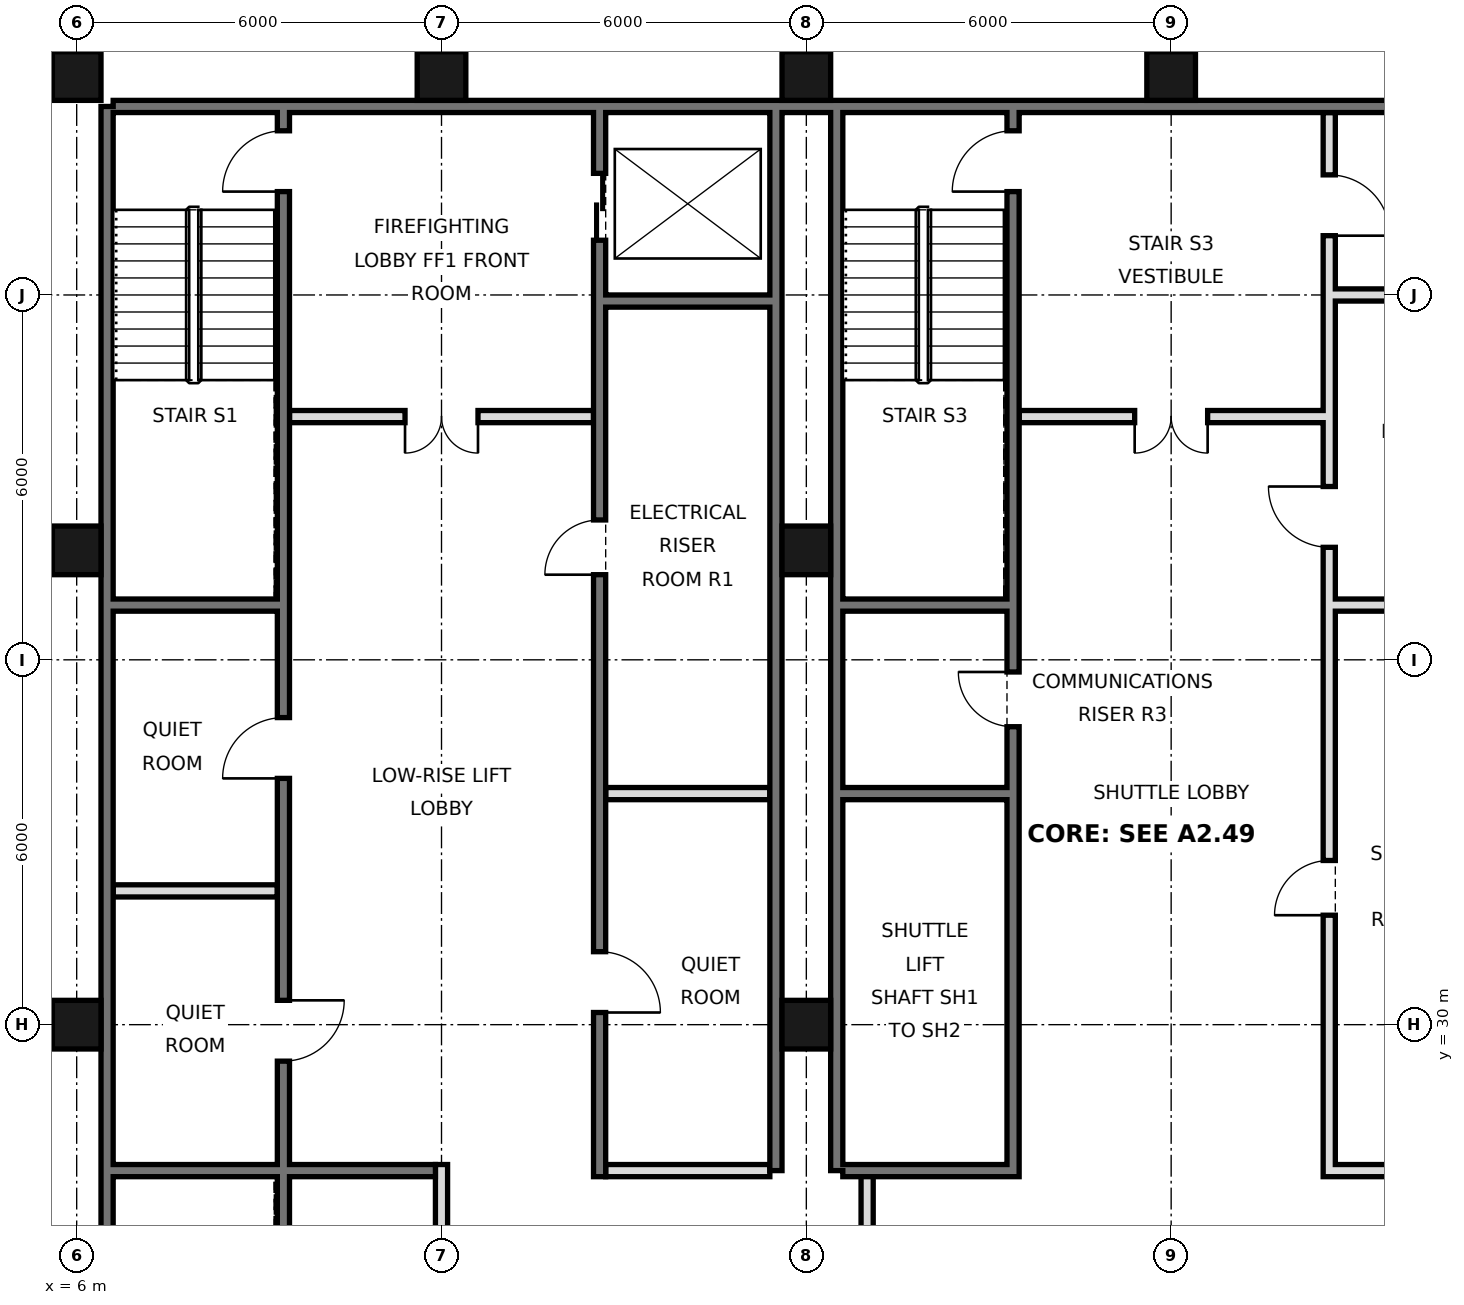
"""IFC4 building model, lengths in metres.
Left out: names, types, materials, properties, quantities, classifications, styles, units other than length and angle.
Written with IfcOpenShell. Run it as: python <this file> out.ifc"""

import sys

from ifc_helpers import new_model, si_unit, direction, frame, frame_2d, origin, origin_2d, place, context, subcontext, project, spatial, rectangle, hollow_rectangle, extrude, element, fill, save


model = new_model("IFC4")
c1 = context("Model", 3, precision=1e-05, world=origin(), true_north=direction((0.0, 1.0)))
c2 = subcontext(c1, "Body", "Model", "MODEL_VIEW")
j1 = project(units=[si_unit("LENGTHUNIT", "METRE"), si_unit("PLANEANGLEUNIT", "RADIAN")], contexts=[c1])
p1 = place(None, origin())
s1 = spatial("IfcSite", under=j1, at=p1, CompositionType="ELEMENT")
p2 = place(p1, origin())
s2 = spatial("IfcBuilding", under=s1, at=p2, CompositionType="ELEMENT")
p3 = place(p2, frame((0.0, 0.0, 195.6)))
s3 = spatial("IfcBuildingStorey", under=s2, at=p3, CompositionType="ELEMENT", Elevation=195.6)
for number, where, z_axis, x_axis in (
    (1, (6.0, 30.0, 0.0), (0.0, 0.0, 1.0), (1.0, 0.0, 0.0)),
    (2, (6.0, 37.8, 0.0), (0.0, 0.0, 1.0), (1.0, 0.0, 0.0)),
    (3, (6.0, 45.6, 0.0), (0.0, 0.0, 1.0), (1.0, 0.0, 0.0)),
    (4, (12.0, 45.6, 0.0), (0.0, 0.0, 1.0), (1.0, 0.0, 0.0)),
    (5, (18.0, 30.0, 0.0), (0.0, 0.0, 1.0), (1.0, 0.0, 0.0)),
    (6, (18.0, 37.8, 0.0), (0.0, 0.0, 1.0), (1.0, 0.0, 0.0)),
    (7, (18.0, 45.6, 0.0), (0.0, 0.0, 1.0), (1.0, 0.0, 0.0)),
    (8, (24.0, 45.6, 0.0), (0.0, 0.0, 1.0), (1.0, 0.0, 0.0)),
):
    element("IfcColumn", number, at=place(p3, frame(where, z_axis=z_axis, x_axis=x_axis)), inside=s3, PredefinedType="COLUMN", context=c2, shape_type="SweptSolid", body=[
        extrude(hollow_rectangle(XDim=0.8, YDim=0.8, WallThickness=0.045, at=origin_2d()), origin(), (0.0, 0.0, 1.0), 3.6),
    ])
p4 = place(p3, frame((6.5, 21.6, 0.0), z_axis=(0.0, 0.0, 1.0), x_axis=(0.0, 1.0, 0.0)))
e9 = element("IfcWall", 9, at=p4, inside=s3, PredefinedType="SOLIDWALL", context=c2, shape_type="SweptSolid", body=[
    extrude(rectangle(XDim=23.5, YDim=0.2, at=frame_2d((11.75, 0.0))), origin(), (0.0, 0.0, 1.0), 3.42),
])
p5 = place(p3, frame((6.6, 45.1, 0.0), z_axis=(0.0, 0.0, 1.0), x_axis=(1.0, 0.0, 0.0)))
e10 = element("IfcWall", 10, at=p5, inside=s3, PredefinedType="SOLIDWALL", context=c2, shape_type="SweptSolid", body=[
    extrude(rectangle(XDim=34.8, YDim=0.2, at=frame_2d((17.4, 0.0))), origin(), (0.0, 0.0, 1.0), 3.42),
])
for number, where, z_axis, x_axis in (
    (11, (17.5, 27.6, 0.0), (0.0, 0.0, 1.0), (0.0, 1.0, 0.0)),
    (12, (18.5, 27.6, 0.0), (0.0, 0.0, 1.0), (0.0, 1.0, 0.0)),
):
    element("IfcWall", number, at=place(p3, frame(where, z_axis=z_axis, x_axis=x_axis)), inside=s3, PredefinedType="SOLIDWALL", context=c2, shape_type="SweptSolid", body=[
        extrude(rectangle(XDim=17.5, YDim=0.2, at=frame_2d((8.75, 0.0))), origin(), (0.0, 0.0, 1.0), 3.42),
    ])
p6 = place(p3, frame((19.0, 21.6, 0.0), z_axis=(0.0, 0.0, 1.0), x_axis=(0.0, 1.0, 0.0)))
e13 = element("IfcWall", 13, at=p6, inside=s3, PredefinedType="PARTITIONING", context=c2, shape_type="SweptSolid", body=[
    extrude(rectangle(XDim=6.0, YDim=0.2, at=frame_2d((3.0, 0.0))), origin(), (0.0, 0.0, 1.0), 3.42),
])
p7 = place(p6, frame((2.1, 0.0, 0.0)))
e14 = element("IfcOpeningElement", 14, at=p7, cuts=e13, PredefinedType="OPENING", context=c2, shape_type="SweptSolid", body=[
    extrude(rectangle(XDim=1.8, YDim=2.1, at=frame_2d((0.9, 1.05))), frame((0.0, 0.11, 0.0), z_axis=(0.0, -1.0, 0.0), x_axis=(1.0, 0.0, 0.0)), (0.0, 0.0, 1.0), 0.22),
])
p8 = place(p3, frame((12.0, 21.6, 0.0), z_axis=(0.0, 0.0, 1.0), x_axis=(0.0, 1.0, 0.0)))
e15 = element("IfcWall", 15, at=p8, inside=s3, PredefinedType="PARTITIONING", context=c2, shape_type="SweptSolid", body=[
    extrude(rectangle(XDim=6.1, YDim=0.2, at=frame_2d((3.05, 0.0))), origin(), (0.0, 0.0, 1.0), 3.42),
])
p9 = place(p3, frame((14.6, 27.5, 0.0), z_axis=(0.0, 0.0, 1.0), x_axis=(0.0, 1.0, 0.0)))
e16 = element("IfcWall", 16, at=p9, inside=s3, PredefinedType="SOLIDWALL", context=c2, shape_type="SweptSolid", body=[
    extrude(rectangle(XDim=17.5, YDim=0.2, at=frame_2d((8.75, 0.0))), origin(), (0.0, 0.0, 1.0), 3.42),
])
p10 = place(p9, frame((15.4, 0.0, 0.0)))
e17 = element("IfcOpeningElement", 17, at=p10, cuts=e16, PredefinedType="OPENING", context=c2, shape_type="SweptSolid", body=[
    extrude(rectangle(XDim=1.1, YDim=2.1, at=frame_2d((0.55, 1.05))), frame((0.0, 0.11, 0.0), z_axis=(0.0, -1.0, 0.0), x_axis=(1.0, 0.0, 0.0)), (0.0, 0.0, 1.0), 0.22),
])
p11 = place(p9, frame((2.7, 0.0, 0.0)))
e18 = element("IfcOpeningElement", 18, at=p11, cuts=e16, PredefinedType="OPENING", context=c2, shape_type="SweptSolid", body=[
    extrude(rectangle(XDim=1.0, YDim=2.1, at=frame_2d((0.5, 1.05))), frame((0.0, 0.11, 0.0), z_axis=(0.0, -1.0, 0.0), x_axis=(1.0, 0.0, 0.0)), (0.0, 0.0, 1.0), 0.22),
])
p12 = place(p9, frame((9.9, 0.0, 0.0)))
e19 = element("IfcOpeningElement", 19, at=p12, cuts=e16, PredefinedType="OPENING", context=c2, shape_type="SweptSolid", body=[
    extrude(rectangle(XDim=0.9, YDim=2.1, at=frame_2d((0.45, 1.05))), frame((0.0, 0.11, 0.0), z_axis=(0.0, -1.0, 0.0), x_axis=(1.0, 0.0, 0.0)), (0.0, 0.0, 1.0), 0.22),
])
p13 = place(p3, frame((21.4, 27.5, 0.0), z_axis=(0.0, 0.0, 1.0), x_axis=(0.0, 1.0, 0.0)))
e20 = element("IfcWall", 20, at=p13, inside=s3, PredefinedType="SOLIDWALL", context=c2, shape_type="SweptSolid", body=[
    extrude(rectangle(XDim=17.5, YDim=0.2, at=frame_2d((8.75, 0.0))), origin(), (0.0, 0.0, 1.0), 3.42),
])
p14 = place(p13, frame((16.2, 0.0, 0.0)))
e21 = element("IfcOpeningElement", 21, at=p14, cuts=e20, PredefinedType="OPENING", context=c2, shape_type="SweptSolid", body=[
    extrude(rectangle(XDim=1.0, YDim=2.1, at=frame_2d((0.5, 1.05))), frame((0.0, 0.11, 0.0), z_axis=(0.0, -1.0, 0.0), x_axis=(1.0, 0.0, 0.0)), (0.0, 0.0, 1.0), 0.22),
])
p15 = place(p13, frame((7.4, 0.0, 0.0)))
e22 = element("IfcOpeningElement", 22, at=p15, cuts=e20, PredefinedType="OPENING", context=c2, shape_type="SweptSolid", body=[
    extrude(rectangle(XDim=0.9, YDim=2.1, at=frame_2d((0.45, 1.05))), frame((0.0, 0.11, 0.0), z_axis=(0.0, -1.0, 0.0), x_axis=(1.0, 0.0, 0.0)), (0.0, 0.0, 1.0), 0.22),
])
p16 = place(p3, frame((26.6, 27.5, 0.0), z_axis=(0.0, 0.0, 1.0), x_axis=(0.0, 1.0, 0.0)))
e23 = element("IfcWall", 23, at=p16, inside=s3, PredefinedType="SOLIDWALL", context=c2, shape_type="SweptSolid", body=[
    extrude(rectangle(XDim=17.5, YDim=0.2, at=frame_2d((8.75, 0.0))), origin(), (0.0, 0.0, 1.0), 3.42),
])
p17 = place(p16, frame((4.3, 0.0, 0.0)))
e24 = element("IfcOpeningElement", 24, at=p17, cuts=e23, PredefinedType="OPENING", context=c2, shape_type="SweptSolid", body=[
    extrude(rectangle(XDim=0.9, YDim=2.1, at=frame_2d((0.45, 1.05))), frame((0.0, 0.11, 0.0), z_axis=(0.0, -1.0, 0.0), x_axis=(1.0, 0.0, 0.0)), (0.0, 0.0, 1.0), 0.22),
])
p18 = place(p16, frame((10.35, 0.0, 0.0)))
e25 = element("IfcOpeningElement", 25, at=p18, cuts=e23, PredefinedType="OPENING", context=c2, shape_type="SweptSolid", body=[
    extrude(rectangle(XDim=1.0, YDim=2.1, at=frame_2d((0.5, 1.05))), frame((0.0, 0.11, 0.0), z_axis=(0.0, -1.0, 0.0), x_axis=(1.0, 0.0, 0.0)), (0.0, 0.0, 1.0), 0.22),
])
p19 = place(p16, frame((15.475, 0.0, 0.0)))
e26 = element("IfcOpeningElement", 26, at=p19, cuts=e23, PredefinedType="OPENING", context=c2, shape_type="SweptSolid", body=[
    extrude(rectangle(XDim=1.0, YDim=2.1, at=frame_2d((0.5, 1.05))), frame((0.0, 0.11, 0.0), z_axis=(0.0, -1.0, 0.0), x_axis=(1.0, 0.0, 0.0)), (0.0, 0.0, 1.0), 0.22),
])
p20 = place(p3, frame((9.4, 21.6, 0.0), z_axis=(0.0, 0.0, 1.0), x_axis=(0.0, 1.0, 0.0)))
e27 = element("IfcWall", 27, at=p20, inside=s3, PredefinedType="SOLIDWALL", context=c2, shape_type="SweptSolid", body=[
    extrude(rectangle(XDim=23.4, YDim=0.2, at=frame_2d((11.7, 0.0))), origin(), (0.0, 0.0, 1.0), 3.42),
])
p21 = place(p20, frame((7.8, 0.0, 0.0)))
e28 = element("IfcOpeningElement", 28, at=p21, cuts=e27, PredefinedType="OPENING", context=c2, shape_type="SweptSolid", body=[
    extrude(rectangle(XDim=1.0, YDim=2.1, at=frame_2d((0.5, 1.05))), frame((0.0, 0.11, 0.0), z_axis=(0.0, -1.0, 0.0), x_axis=(1.0, 0.0, 0.0)), (0.0, 0.0, 1.0), 0.22),
])
p22 = place(p20, frame((12.45, 0.0, 0.0)))
e29 = element("IfcOpeningElement", 29, at=p22, cuts=e27, PredefinedType="OPENING", context=c2, shape_type="SweptSolid", body=[
    extrude(rectangle(XDim=1.0, YDim=2.1, at=frame_2d((0.5, 1.05))), frame((0.0, 0.11, 0.0), z_axis=(0.0, -1.0, 0.0), x_axis=(1.0, 0.0, 0.0)), (0.0, 0.0, 1.0), 0.22),
])
p23 = place(p20, frame((22.1, 0.0, 0.0)))
e30 = element("IfcOpeningElement", 30, at=p23, cuts=e27, PredefinedType="OPENING", context=c2, shape_type="SweptSolid", body=[
    extrude(rectangle(XDim=1.0, YDim=2.1, at=frame_2d((0.5, 1.05))), frame((0.0, 0.11, 0.0), z_axis=(0.0, -1.0, 0.0), x_axis=(1.0, 0.0, 0.0)), (0.0, 0.0, 1.0), 0.22),
])
p24 = place(p20, frame((0.175, 0.0, 0.0)))
e31 = element("IfcOpeningElement", 31, at=p24, cuts=e27, PredefinedType="OPENING", context=c2, shape_type="SweptSolid", body=[
    extrude(rectangle(XDim=0.9, YDim=2.1, at=frame_2d((0.45, 1.05))), frame((0.0, 0.11, 0.0), z_axis=(0.0, -1.0, 0.0), x_axis=(1.0, 0.0, 0.0)), (0.0, 0.0, 1.0), 0.22),
])
p25 = place(p3, frame((14.7, 27.6, 0.0), z_axis=(0.0, 0.0, 1.0), x_axis=(1.0, 0.0, 0.0)))
e32 = element("IfcWall", 32, at=p25, inside=s3, PredefinedType="PARTITIONING", context=c2, shape_type="SweptSolid", body=[
    extrude(rectangle(XDim=2.7, YDim=0.2, at=frame_2d((1.35, 0.0))), origin(), (0.0, 0.0, 1.0), 3.42),
])
for number, where, z_axis, x_axis in (
    (33, (18.6, 27.6, 0.0), (0.0, 0.0, 1.0), (1.0, 0.0, 0.0)),
    (34, (26.7, 27.6, 0.0), (0.0, 0.0, 1.0), (1.0, 0.0, 0.0)),
):
    element("IfcWall", number, at=place(p3, frame(where, z_axis=z_axis, x_axis=x_axis)), inside=s3, PredefinedType="SOLIDWALL", context=c2, shape_type="SweptSolid", body=[
        extrude(rectangle(XDim=2.7, YDim=0.2, at=frame_2d((1.35, 0.0))), origin(), (0.0, 0.0, 1.0), 3.42),
    ])
p26 = place(p3, frame((6.6, 27.6, 0.0), z_axis=(0.0, 0.0, 1.0), x_axis=(1.0, 0.0, 0.0)))
e35 = element("IfcWall", 35, at=p26, inside=s3, PredefinedType="SOLIDWALL", context=c2, shape_type="SweptSolid", body=[
    extrude(rectangle(XDim=5.3, YDim=0.2, at=frame_2d((2.65, 0.0))), origin(), (0.0, 0.0, 1.0), 3.42),
])
p27 = place(p3, frame((6.6, 32.2, 0.0), z_axis=(0.0, 0.0, 1.0), x_axis=(1.0, 0.0, 0.0)))
e36 = element("IfcWall", 36, at=p27, inside=s3, PredefinedType="PARTITIONING", context=c2, shape_type="SweptSolid", body=[
    extrude(rectangle(XDim=2.7, YDim=0.2, at=frame_2d((1.35, 0.0))), origin(), (0.0, 0.0, 1.0), 3.42),
])
for number, where, z_axis, x_axis in (
    (37, (14.7, 33.8, 0.0), (0.0, 0.0, 1.0), (1.0, 0.0, 0.0)),
    (38, (18.6, 33.8, 0.0), (0.0, 0.0, 1.0), (1.0, 0.0, 0.0)),
    (39, (18.6, 36.9, 0.0), (0.0, 0.0, 1.0), (1.0, 0.0, 0.0)),
    (40, (26.7, 36.9, 0.0), (0.0, 0.0, 1.0), (1.0, 0.0, 0.0)),
    (41, (6.6, 36.9, 0.0), (0.0, 0.0, 1.0), (1.0, 0.0, 0.0)),
):
    element("IfcWall", number, at=place(p3, frame(where, z_axis=z_axis, x_axis=x_axis)), inside=s3, PredefinedType="SOLIDWALL", context=c2, shape_type="SweptSolid", body=[
        extrude(rectangle(XDim=2.7, YDim=0.2, at=frame_2d((1.35, 0.0))), origin(), (0.0, 0.0, 1.0), 3.42),
    ])
p28 = place(p3, frame((21.5, 40.0, 0.0), z_axis=(0.0, 0.0, 1.0), x_axis=(1.0, 0.0, 0.0)))
e42 = element("IfcWall", 42, at=p28, inside=s3, PredefinedType="PARTITIONING", context=c2, shape_type="SweptSolid", body=[
    extrude(rectangle(XDim=5.0, YDim=0.2, at=frame_2d((2.5, 0.0))), origin(), (0.0, 0.0, 1.0), 3.42),
])
p29 = place(p28, frame((1.9, 0.0, 0.0)))
e43 = element("IfcOpeningElement", 43, at=p29, cuts=e42, PredefinedType="OPENING", context=c2, shape_type="SweptSolid", body=[
    extrude(rectangle(XDim=1.2, YDim=2.1, at=frame_2d((0.6, 1.05))), frame((0.0, 0.11, 0.0), z_axis=(0.0, -1.0, 0.0), x_axis=(1.0, 0.0, 0.0)), (0.0, 0.0, 1.0), 0.22),
])
p30 = place(p3, frame((9.5, 40.0, 0.0), z_axis=(0.0, 0.0, 1.0), x_axis=(1.0, 0.0, 0.0)))
e44 = element("IfcWall", 44, at=p30, inside=s3, PredefinedType="PARTITIONING", context=c2, shape_type="SweptSolid", body=[
    extrude(rectangle(XDim=5.0, YDim=0.2, at=frame_2d((2.5, 0.0))), origin(), (0.0, 0.0, 1.0), 3.42),
])
p31 = place(p30, frame((1.9, 0.0, 0.0)))
e45 = element("IfcOpeningElement", 45, at=p31, cuts=e44, PredefinedType="OPENING", context=c2, shape_type="SweptSolid", body=[
    extrude(rectangle(XDim=1.2, YDim=2.1, at=frame_2d((0.6, 1.05))), frame((0.0, 0.11, 0.0), z_axis=(0.0, -1.0, 0.0), x_axis=(1.0, 0.0, 0.0)), (0.0, 0.0, 1.0), 0.22),
])
p32 = place(p3, frame((14.7, 41.9, 0.0), z_axis=(0.0, 0.0, 1.0), x_axis=(1.0, 0.0, 0.0)))
e46 = element("IfcWall", 46, at=p32, inside=s3, PredefinedType="SOLIDWALL", context=c2, shape_type="SweptSolid", body=[
    extrude(rectangle(XDim=2.7, YDim=0.2, at=frame_2d((1.35, 0.0))), origin(), (0.0, 0.0, 1.0), 3.42),
])
p33 = place(p3, frame((26.7, 42.0, 0.0), z_axis=(0.0, 0.0, 1.0), x_axis=(1.0, 0.0, 0.0)))
e47 = element("IfcWall", 47, at=p33, inside=s3, PredefinedType="PARTITIONING", context=c2, shape_type="SweptSolid", body=[
    extrude(rectangle(XDim=2.7, YDim=0.2, at=frame_2d((1.35, 0.0))), origin(), (0.0, 0.0, 1.0), 3.42),
])
p34 = place(p31, frame((1.2, 0.0, 0.0), z_axis=(0.0, 0.0, 1.0), x_axis=(-1.0, 0.0, 0.0)))
e48 = element("IfcDoor", 48, at=p34, inside=s3, OperationType="DOUBLE_DOOR_SINGLE_SWING", PredefinedType="DOOR", context=c2, shape_type="SweptSolid", body=[
    extrude(rectangle(XDim=1.2, YDim=2.1, at=frame_2d((0.6, 1.05))), frame((0.0, 0.025, 0.0), z_axis=(0.0, -1.0, 0.0), x_axis=(1.0, 0.0, 0.0)), (0.0, 0.0, 1.0), 0.05),
])
fill(e45, e48)
p35 = place(p29, frame((1.2, 0.0, 0.0), z_axis=(0.0, 0.0, 1.0), x_axis=(-1.0, 0.0, 0.0)))
e49 = element("IfcDoor", 49, at=p35, inside=s3, OperationType="DOUBLE_DOOR_SINGLE_SWING", PredefinedType="DOOR", context=c2, shape_type="SweptSolid", body=[
    extrude(rectangle(XDim=1.2, YDim=2.1, at=frame_2d((0.6, 1.05))), frame((0.0, 0.025, 0.0), z_axis=(0.0, -1.0, 0.0), x_axis=(1.0, 0.0, 0.0)), (0.0, 0.0, 1.0), 0.05),
])
fill(e43, e49)
p36 = place(p10, origin())
e50 = element("IfcDoor", 50, at=p36, inside=s3, OperationType="DOUBLE_DOOR_SLIDING", PredefinedType="DOOR", context=c2, shape_type="SweptSolid", body=[
    extrude(rectangle(XDim=1.1, YDim=2.1, at=frame_2d((0.55, 1.05))), frame((0.0, 0.025, 0.0), z_axis=(0.0, -1.0, 0.0), x_axis=(1.0, 0.0, 0.0)), (0.0, 0.0, 1.0), 0.05),
])
fill(e17, e50)
p37 = place(p11, frame((1.0, 0.0, 0.0), z_axis=(0.0, 0.0, 1.0), x_axis=(-1.0, 0.0, 0.0)))
e51 = element("IfcDoor", 51, at=p37, inside=s3, OperationType="SINGLE_SWING_RIGHT", PredefinedType="DOOR", context=c2, shape_type="SweptSolid", body=[
    extrude(rectangle(XDim=1.0, YDim=2.1, at=frame_2d((0.5, 1.05))), frame((0.0, 0.025, 0.0), z_axis=(0.0, -1.0, 0.0), x_axis=(1.0, 0.0, 0.0)), (0.0, 0.0, 1.0), 0.05),
])
fill(e18, e51)
p38 = place(p21, origin())
e52 = element("IfcDoor", 52, at=p38, inside=s3, OperationType="SINGLE_SWING_RIGHT", PredefinedType="DOOR", context=c2, shape_type="SweptSolid", body=[
    extrude(rectangle(XDim=1.0, YDim=2.1, at=frame_2d((0.5, 1.05))), frame((0.0, 0.025, 0.0), z_axis=(0.0, -1.0, 0.0), x_axis=(1.0, 0.0, 0.0)), (0.0, 0.0, 1.0), 0.05),
])
fill(e28, e52)
p39 = place(p22, origin())
e53 = element("IfcDoor", 53, at=p39, inside=s3, OperationType="SINGLE_SWING_LEFT", PredefinedType="DOOR", context=c2, shape_type="SweptSolid", body=[
    extrude(rectangle(XDim=1.0, YDim=2.1, at=frame_2d((0.5, 1.05))), frame((0.0, 0.025, 0.0), z_axis=(0.0, -1.0, 0.0), x_axis=(1.0, 0.0, 0.0)), (0.0, 0.0, 1.0), 0.05),
])
fill(e29, e53)
p40 = place(p23, origin())
e54 = element("IfcDoor", 54, at=p40, inside=s3, OperationType="SINGLE_SWING_LEFT", PredefinedType="DOOR", context=c2, shape_type="SweptSolid", body=[
    extrude(rectangle(XDim=1.0, YDim=2.1, at=frame_2d((0.5, 1.05))), frame((0.0, 0.025, 0.0), z_axis=(0.0, -1.0, 0.0), x_axis=(1.0, 0.0, 0.0)), (0.0, 0.0, 1.0), 0.05),
])
fill(e30, e54)
p41 = place(p14, origin())
e55 = element("IfcDoor", 55, at=p41, inside=s3, OperationType="SINGLE_SWING_LEFT", PredefinedType="DOOR", context=c2, shape_type="SweptSolid", body=[
    extrude(rectangle(XDim=1.0, YDim=2.1, at=frame_2d((0.5, 1.05))), frame((0.0, 0.025, 0.0), z_axis=(0.0, -1.0, 0.0), x_axis=(1.0, 0.0, 0.0)), (0.0, 0.0, 1.0), 0.05),
])
fill(e21, e55)
p42 = place(p12, origin())
e56 = element("IfcDoor", 56, at=p42, inside=s3, OperationType="SINGLE_SWING_LEFT", PredefinedType="DOOR", context=c2, shape_type="SweptSolid", body=[
    extrude(rectangle(XDim=0.9, YDim=2.1, at=frame_2d((0.45, 1.05))), frame((0.0, 0.025, 0.0), z_axis=(0.0, -1.0, 0.0), x_axis=(1.0, 0.0, 0.0)), (0.0, 0.0, 1.0), 0.05),
])
fill(e19, e56)
p43 = place(p15, frame((0.9, 0.0, 0.0), z_axis=(0.0, 0.0, 1.0), x_axis=(-1.0, 0.0, 0.0)))
e57 = element("IfcDoor", 57, at=p43, inside=s3, OperationType="SINGLE_SWING_LEFT", PredefinedType="DOOR", context=c2, shape_type="SweptSolid", body=[
    extrude(rectangle(XDim=0.9, YDim=2.1, at=frame_2d((0.45, 1.05))), frame((0.0, 0.025, 0.0), z_axis=(0.0, -1.0, 0.0), x_axis=(1.0, 0.0, 0.0)), (0.0, 0.0, 1.0), 0.05),
])
fill(e22, e57)
p44 = place(p17, origin())
e58 = element("IfcDoor", 58, at=p44, inside=s3, OperationType="SINGLE_SWING_LEFT", PredefinedType="DOOR", context=c2, shape_type="SweptSolid", body=[
    extrude(rectangle(XDim=0.9, YDim=2.1, at=frame_2d((0.45, 1.05))), frame((0.0, 0.025, 0.0), z_axis=(0.0, -1.0, 0.0), x_axis=(1.0, 0.0, 0.0)), (0.0, 0.0, 1.0), 0.05),
])
fill(e24, e58)
p45 = place(p18, frame((1.0, 0.0, 0.0), z_axis=(0.0, 0.0, 1.0), x_axis=(-1.0, 0.0, 0.0)))
e59 = element("IfcDoor", 59, at=p45, inside=s3, OperationType="SINGLE_SWING_LEFT", PredefinedType="DOOR", context=c2, shape_type="SweptSolid", body=[
    extrude(rectangle(XDim=1.0, YDim=2.1, at=frame_2d((0.5, 1.05))), frame((0.0, 0.025, 0.0), z_axis=(0.0, -1.0, 0.0), x_axis=(1.0, 0.0, 0.0)), (0.0, 0.0, 1.0), 0.05),
])
fill(e25, e59)
p46 = place(p19, frame((1.0, 0.0, 0.0), z_axis=(0.0, 0.0, 1.0), x_axis=(-1.0, 0.0, 0.0)))
e60 = element("IfcDoor", 60, at=p46, inside=s3, OperationType="SINGLE_SWING_RIGHT", PredefinedType="DOOR", context=c2, shape_type="SweptSolid", body=[
    extrude(rectangle(XDim=1.0, YDim=2.1, at=frame_2d((0.5, 1.05))), frame((0.0, 0.025, 0.0), z_axis=(0.0, -1.0, 0.0), x_axis=(1.0, 0.0, 0.0)), (0.0, 0.0, 1.0), 0.05),
])
fill(e26, e60)
save(model, sys.argv[1])
